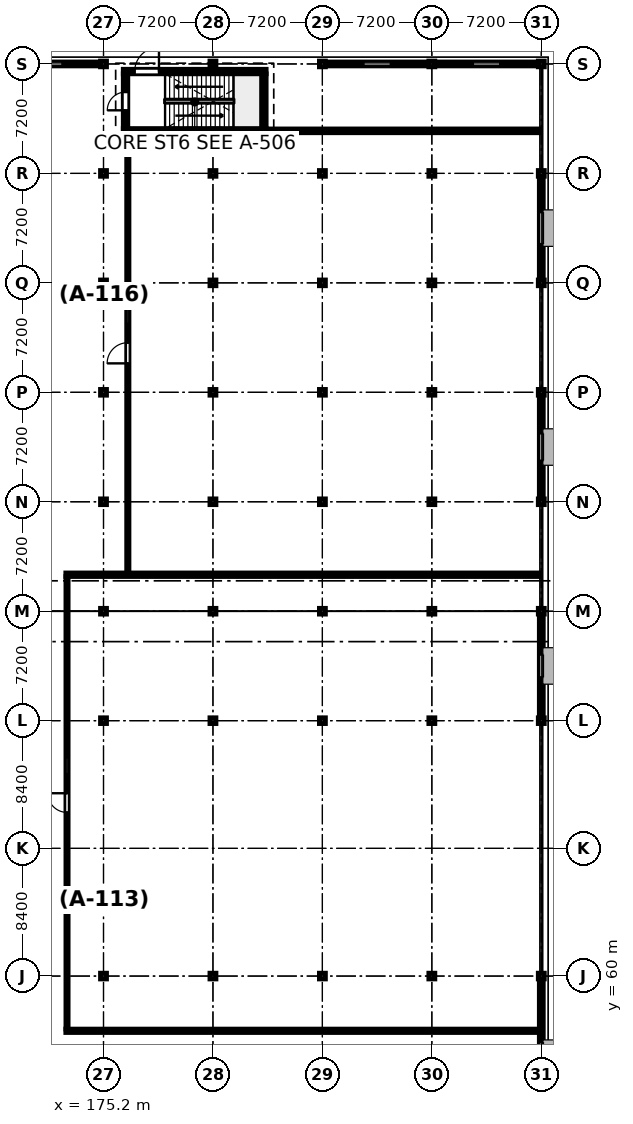
"""IFC4 building model, lengths in metres.
Left out: names, types, materials, properties, quantities, classifications, styles, units other than length and angle.
Written with IfcOpenShell. Run it as: python <this file> out.ifc"""

import sys

from ifc_helpers import new_model, si_unit, direction, frame, frame_2d, origin, origin_2d, place, context, subcontext, project, spatial, rectangle, i_section, extrude, element, fill, save


model = new_model("IFC4")
c1 = context("Model", 3, precision=1e-05, world=origin(), true_north=direction((0.0, 1.0)))
c2 = subcontext(c1, "Body", "Model", "MODEL_VIEW")
j1 = project(units=[si_unit("LENGTHUNIT", "METRE"), si_unit("PLANEANGLEUNIT", "RADIAN")], contexts=[c1])
p1 = place(None, origin())
s1 = spatial("IfcSite", under=j1, at=p1, CompositionType="ELEMENT")
p2 = place(p1, origin())
s2 = spatial("IfcBuilding", under=s1, at=p2, CompositionType="ELEMENT")
p3 = place(p2, origin())
s3 = spatial("IfcBuildingStorey", under=s2, at=p3, CompositionType="ELEMENT", Elevation=0.0)
for number, where, z_axis, x_axis in (
    (1, (175.2, 60.0, 0.0), (0.0, 0.0, 1.0), (1.0, 0.0, 0.0)),
    (2, (175.2, 76.8, 0.0), (0.0, 0.0, 1.0), (1.0, 0.0, 0.0)),
    (3, (175.2, 84.0, 0.0), (0.0, 0.0, 1.0), (1.0, 0.0, 0.0)),
    (4, (175.2, 91.2, 0.0), (0.0, 0.0, 1.0), (1.0, 0.0, 0.0)),
    (5, (175.2, 98.4, 0.0), (0.0, 0.0, 1.0), (1.0, 0.0, 0.0)),
    (6, (175.2, 105.6, 0.0), (0.0, 0.0, 1.0), (1.0, 0.0, 0.0)),
    (7, (175.2, 112.8, 0.0), (0.0, 0.0, 1.0), (1.0, 0.0, 0.0)),
    (8, (175.2, 120.0, 0.0), (0.0, 0.0, 1.0), (1.0, 0.0, 0.0)),
    (9, (182.4, 60.0, 0.0), (0.0, 0.0, 1.0), (1.0, 0.0, 0.0)),
    (10, (182.4, 76.8, 0.0), (0.0, 0.0, 1.0), (1.0, 0.0, 0.0)),
    (11, (182.4, 84.0, 0.0), (0.0, 0.0, 1.0), (1.0, 0.0, 0.0)),
    (12, (182.4, 91.2, 0.0), (0.0, 0.0, 1.0), (1.0, 0.0, 0.0)),
    (13, (182.4, 98.4, 0.0), (0.0, 0.0, 1.0), (1.0, 0.0, 0.0)),
    (14, (182.4, 105.6, 0.0), (0.0, 0.0, 1.0), (1.0, 0.0, 0.0)),
    (15, (182.4, 112.8, 0.0), (0.0, 0.0, 1.0), (1.0, 0.0, 0.0)),
    (16, (182.4, 120.0, 0.0), (0.0, 0.0, 1.0), (1.0, 0.0, 0.0)),
    (17, (189.6, 60.0, 0.0), (0.0, 0.0, 1.0), (1.0, 0.0, 0.0)),
    (18, (189.6, 76.8, 0.0), (0.0, 0.0, 1.0), (1.0, 0.0, 0.0)),
    (19, (189.6, 84.0, 0.0), (0.0, 0.0, 1.0), (1.0, 0.0, 0.0)),
    (20, (189.6, 91.2, 0.0), (0.0, 0.0, 1.0), (1.0, 0.0, 0.0)),
    (21, (189.6, 98.4, 0.0), (0.0, 0.0, 1.0), (1.0, 0.0, 0.0)),
    (22, (189.6, 105.6, 0.0), (0.0, 0.0, 1.0), (1.0, 0.0, 0.0)),
    (23, (189.6, 112.8, 0.0), (0.0, 0.0, 1.0), (1.0, 0.0, 0.0)),
    (24, (189.6, 120.0, 0.0), (0.0, 0.0, 1.0), (1.0, 0.0, 0.0)),
    (25, (196.8, 60.0, 0.0), (0.0, 0.0, 1.0), (1.0, 0.0, 0.0)),
    (26, (196.8, 76.8, 0.0), (0.0, 0.0, 1.0), (1.0, 0.0, 0.0)),
    (27, (196.8, 84.0, 0.0), (0.0, 0.0, 1.0), (1.0, 0.0, 0.0)),
    (28, (196.8, 91.2, 0.0), (0.0, 0.0, 1.0), (1.0, 0.0, 0.0)),
    (29, (196.8, 98.4, 0.0), (0.0, 0.0, 1.0), (1.0, 0.0, 0.0)),
    (30, (196.8, 105.6, 0.0), (0.0, 0.0, 1.0), (1.0, 0.0, 0.0)),
    (31, (196.8, 112.8, 0.0), (0.0, 0.0, 1.0), (1.0, 0.0, 0.0)),
    (32, (196.8, 120.0, 0.0), (0.0, 0.0, 1.0), (1.0, 0.0, 0.0)),
    (33, (204.0, 60.0, 0.0), (0.0, 0.0, 1.0), (1.0, 0.0, 0.0)),
    (34, (204.0, 76.8, 0.0), (0.0, 0.0, 1.0), (1.0, 0.0, 0.0)),
    (35, (204.0, 84.0, 0.0), (0.0, 0.0, 1.0), (1.0, 0.0, 0.0)),
    (36, (204.0, 91.2, 0.0), (0.0, 0.0, 1.0), (1.0, 0.0, 0.0)),
    (37, (204.0, 98.4, 0.0), (0.0, 0.0, 1.0), (1.0, 0.0, 0.0)),
    (38, (204.0, 105.6, 0.0), (0.0, 0.0, 1.0), (1.0, 0.0, 0.0)),
    (39, (204.0, 112.8, 0.0), (0.0, 0.0, 1.0), (1.0, 0.0, 0.0)),
    (40, (204.0, 120.0, 0.0), (0.0, 0.0, 1.0), (1.0, 0.0, 0.0)),
):
    element("IfcColumn", number, at=place(p3, frame(where, z_axis=z_axis, x_axis=x_axis)), inside=s3, PredefinedType="COLUMN", context=c2, shape_type="SweptSolid", body=[
        extrude(i_section(OverallWidth=0.396, OverallDepth=0.381, WebThickness=0.019, FlangeThickness=0.03, FilletRadius=0.015, at=origin_2d()), origin(), (0.0, 0.0, 1.0), 5.4),
    ])
p4 = place(p3, frame((204.0, 59.808, 0.0), z_axis=(0.0, 0.0, 1.0), x_axis=(0.0, -1.0, 0.0)))
e41 = element("IfcWall", 41, at=p4, inside=s3, PredefinedType="STANDARD", context=c2, shape_type="SweptSolid", body=[
    extrude(rectangle(XDim=10.416, YDim=0.26, at=frame_2d((5.208, 0.0))), origin(), (0.0, 0.0, 1.0), 4.442),
])
p5 = place(p4, frame((4.158, 0.0, 0.9)))
e42 = element("IfcOpeningElement", 42, at=p5, cuts=e41, PredefinedType="OPENING", context=c2, shape_type="SweptSolid", body=[
    extrude(rectangle(XDim=2.1, YDim=1.5, at=frame_2d((1.05, 0.75))), frame((0.0, 0.14, 0.0), z_axis=(0.0, -1.0, 0.0), x_axis=(1.0, 0.0, 0.0)), (0.0, 0.0, 1.0), 0.28),
])
p6 = place(p3, frame((204.0, 83.808, 0.0), z_axis=(0.0, 0.0, 1.0), x_axis=(0.0, -1.0, 0.0)))
e43 = element("IfcWall", 43, at=p6, inside=s3, PredefinedType="STANDARD", context=c2, shape_type="SweptSolid", body=[
    extrude(rectangle(XDim=6.816, YDim=0.26, at=frame_2d((3.408, 0.0))), origin(), (0.0, 0.0, 1.0), 4.442),
])
p7 = place(p6, frame((2.658, 0.0, 0.9)))
e44 = element("IfcOpeningElement", 44, at=p7, cuts=e43, PredefinedType="OPENING", context=c2, shape_type="SweptSolid", body=[
    extrude(rectangle(XDim=1.5, YDim=1.5, at=frame_2d((0.75, 0.75))), frame((0.0, 0.14, 0.0), z_axis=(0.0, -1.0, 0.0), x_axis=(1.0, 0.0, 0.0)), (0.0, 0.0, 1.0), 0.28),
])
p8 = place(p3, frame((204.0, 98.208, 0.0), z_axis=(0.0, 0.0, 1.0), x_axis=(0.0, -1.0, 0.0)))
e45 = element("IfcWall", 45, at=p8, inside=s3, PredefinedType="STANDARD", context=c2, shape_type="SweptSolid", body=[
    extrude(rectangle(XDim=6.816, YDim=0.26, at=frame_2d((3.408, 0.0))), origin(), (0.0, 0.0, 1.0), 4.442),
])
p9 = place(p8, frame((2.508, 0.0, 0.9)))
e46 = element("IfcOpeningElement", 46, at=p9, cuts=e45, PredefinedType="OPENING", context=c2, shape_type="SweptSolid", body=[
    extrude(rectangle(XDim=1.8, YDim=1.5, at=frame_2d((0.9, 0.75))), frame((0.0, 0.14, 0.0), z_axis=(0.0, -1.0, 0.0), x_axis=(1.0, 0.0, 0.0)), (0.0, 0.0, 1.0), 0.28),
])
p10 = place(p3, frame((204.0, 112.608, 0.0), z_axis=(0.0, 0.0, 1.0), x_axis=(0.0, -1.0, 0.0)))
e47 = element("IfcWall", 47, at=p10, inside=s3, PredefinedType="STANDARD", context=c2, shape_type="SweptSolid", body=[
    extrude(rectangle(XDim=6.816, YDim=0.26, at=frame_2d((3.408, 0.0))), origin(), (0.0, 0.0, 1.0), 4.442),
])
p11 = place(p10, frame((2.358, 0.0, 0.9)))
e48 = element("IfcOpeningElement", 48, at=p11, cuts=e47, PredefinedType="OPENING", context=c2, shape_type="SweptSolid", body=[
    extrude(rectangle(XDim=2.1, YDim=1.5, at=frame_2d((1.05, 0.75))), frame((0.0, 0.14, 0.0), z_axis=(0.0, -1.0, 0.0), x_axis=(1.0, 0.0, 0.0)), (0.0, 0.0, 1.0), 0.28),
])
p12 = place(p3, frame((168.205, 120.0, 0.0), z_axis=(0.0, 0.0, 1.0), x_axis=(1.0, 0.0, 0.0)))
e49 = element("IfcWall", 49, at=p12, inside=s3, PredefinedType="STANDARD", context=c2, shape_type="SweptSolid", body=[
    extrude(rectangle(XDim=6.79, YDim=0.26, at=frame_2d((3.395, 0.0))), origin(), (0.0, 0.0, 1.0), 4.442),
])
p13 = place(p12, frame((2.495, 0.0, 0.9)))
e50 = element("IfcOpeningElement", 50, at=p13, cuts=e49, PredefinedType="OPENING", context=c2, shape_type="SweptSolid", body=[
    extrude(rectangle(XDim=1.8, YDim=1.5, at=frame_2d((0.9, 0.75))), frame((0.0, 0.14, 0.0), z_axis=(0.0, -1.0, 0.0), x_axis=(1.0, 0.0, 0.0)), (0.0, 0.0, 1.0), 0.28),
])
p14 = place(p3, frame((189.805, 120.0, 0.0), z_axis=(0.0, 0.0, 1.0), x_axis=(1.0, 0.0, 0.0)))
e51 = element("IfcWall", 51, at=p14, inside=s3, PredefinedType="STANDARD", context=c2, shape_type="SweptSolid", body=[
    extrude(rectangle(XDim=6.79, YDim=0.26, at=frame_2d((3.395, 0.0))), origin(), (0.0, 0.0, 1.0), 4.442),
])
p15 = place(p14, frame((2.495, 0.0, 0.9)))
e52 = element("IfcOpeningElement", 52, at=p15, cuts=e51, PredefinedType="OPENING", context=c2, shape_type="SweptSolid", body=[
    extrude(rectangle(XDim=1.8, YDim=1.5, at=frame_2d((0.9, 0.75))), frame((0.0, 0.14, 0.0), z_axis=(0.0, -1.0, 0.0), x_axis=(1.0, 0.0, 0.0)), (0.0, 0.0, 1.0), 0.28),
])
p16 = place(p3, frame((197.005, 120.0, 0.0), z_axis=(0.0, 0.0, 1.0), x_axis=(1.0, 0.0, 0.0)))
e53 = element("IfcWall", 53, at=p16, inside=s3, PredefinedType="STANDARD", context=c2, shape_type="SweptSolid", body=[
    extrude(rectangle(XDim=6.79, YDim=0.26, at=frame_2d((3.395, 0.0))), origin(), (0.0, 0.0, 1.0), 4.442),
])
p17 = place(p16, frame((2.495, 0.0, 0.9)))
e54 = element("IfcOpeningElement", 54, at=p17, cuts=e53, PredefinedType="OPENING", context=c2, shape_type="SweptSolid", body=[
    extrude(rectangle(XDim=1.8, YDim=1.5, at=frame_2d((0.9, 0.75))), frame((0.0, 0.14, 0.0), z_axis=(0.0, -1.0, 0.0), x_axis=(1.0, 0.0, 0.0)), (0.0, 0.0, 1.0), 0.28),
])
p18 = place(p3, frame((185.9, 115.6, 0.0), z_axis=(0.0, 0.0, 1.0), x_axis=(-1.0, 0.0, 0.0)))
e55 = element("IfcWall", 55, at=p18, inside=s3, PredefinedType="SOLIDWALL", context=c2, shape_type="SweptSolid", body=[
    extrude(rectangle(XDim=9.4, YDim=0.3, at=frame_2d((4.7, 0.0))), origin(), (0.0, 0.0, 1.0), 5.14),
])
p19 = place(p3, frame((176.5, 119.5, 0.0), z_axis=(0.0, 0.0, 1.0), x_axis=(1.0, 0.0, 0.0)))
e56 = element("IfcWall", 56, at=p19, inside=s3, PredefinedType="SOLIDWALL", context=c2, shape_type="SweptSolid", body=[
    extrude(rectangle(XDim=9.4, YDim=0.3, at=frame_2d((4.7, 0.0))), origin(), (0.0, 0.0, 1.0), 5.14),
])
p20 = place(p19, frame((0.75, 0.0, 0.0)))
e57 = element("IfcOpeningElement", 57, at=p20, cuts=e56, PredefinedType="OPENING", context=c2, shape_type="SweptSolid", body=[
    extrude(rectangle(XDim=1.6, YDim=2.15, at=frame_2d((0.8, 1.075))), frame((0.0, 0.16, 0.0), z_axis=(0.0, -1.0, 0.0), x_axis=(1.0, 0.0, 0.0)), (0.0, 0.0, 1.0), 0.32),
])
p21 = place(p3, frame((176.65, 115.75, 0.0), z_axis=(0.0, 0.0, 1.0), x_axis=(0.0, 1.0, 0.0)))
e58 = element("IfcWall", 58, at=p21, inside=s3, PredefinedType="SOLIDWALL", context=c2, shape_type="SweptSolid", body=[
    extrude(rectangle(XDim=3.6, YDim=0.3, at=frame_2d((1.8, 0.0))), origin(), (0.0, 0.0, 1.0), 5.14),
])
p22 = place(p21, frame((1.2, 0.0, 0.0)))
e59 = element("IfcOpeningElement", 59, at=p22, cuts=e58, PredefinedType="OPENING", context=c2, shape_type="SweptSolid", body=[
    extrude(rectangle(XDim=1.2, YDim=2.2, at=frame_2d((0.6, 1.1))), frame((0.0, 0.16, 0.0), z_axis=(0.0, -1.0, 0.0), x_axis=(1.0, 0.0, 0.0)), (0.0, 0.0, 1.0), 0.32),
])
p23 = place(p3, frame((185.75, 119.35, 0.0), z_axis=(0.0, 0.0, 1.0), x_axis=(0.0, -1.0, 0.0)))
e60 = element("IfcWall", 60, at=p23, inside=s3, PredefinedType="SOLIDWALL", context=c2, shape_type="SweptSolid", body=[
    extrude(rectangle(XDim=3.6, YDim=0.3, at=frame_2d((1.8, 0.0))), origin(), (0.0, 0.0, 1.0), 5.14),
])
p24 = place(p3, frame((203.868, 56.4, 0.0), z_axis=(0.0, 0.0, 1.0), x_axis=(-1.0, 0.0, 0.0)))
e61 = element("IfcWall", 61, at=p24, inside=s3, PredefinedType="PARTITIONING", context=c2, shape_type="SweptSolid", body=[
    extrude(rectangle(XDim=31.148, YDim=0.225, at=frame_2d((15.574, 0.0))), origin(), (0.0, 0.0, 1.0), 4.437),
])
p25 = place(p3, frame((172.72, 86.4, 0.0), z_axis=(0.0, 0.0, 1.0), x_axis=(1.0, 0.0, 0.0)))
e62 = element("IfcWall", 62, at=p25, inside=s3, PredefinedType="PARTITIONING", context=c2, shape_type="SweptSolid", body=[
    extrude(rectangle(XDim=31.148, YDim=0.235, at=frame_2d((15.574, 0.0))), origin(), (0.0, 0.0, 1.0), 4.437),
])
p26 = place(p3, frame((185.902, 115.6, 0.0), z_axis=(0.0, 0.0, 1.0), x_axis=(1.0, 0.0, 0.0)))
e63 = element("IfcWall", 63, at=p26, inside=s3, PredefinedType="PARTITIONING", context=c2, shape_type="SweptSolid", body=[
    extrude(rectangle(XDim=17.966, YDim=0.25, at=frame_2d((8.983, 0.0))), origin(), (0.0, 0.0, 1.0), 4.437),
])
p27 = place(p3, frame((172.8, 56.514, 0.0), z_axis=(0.0, 0.0, 1.0), x_axis=(0.0, 1.0, 0.0)))
e64 = element("IfcWall", 64, at=p27, inside=s3, PredefinedType="PARTITIONING", context=c2, shape_type="SweptSolid", body=[
    extrude(rectangle(XDim=29.766, YDim=0.145, at=frame_2d((14.883, 0.0))), origin(), (0.0, 0.0, 1.0), 4.437),
])
p28 = place(p27, frame((14.253, 0.0, 0.0)))
e65 = element("IfcOpeningElement", 65, at=p28, cuts=e64, PredefinedType="OPENING", context=c2, shape_type="SweptSolid", body=[
    extrude(rectangle(XDim=1.26, YDim=2.22, at=frame_2d((0.63, 1.11))), frame((0.0, 0.083, 0.0), z_axis=(0.0, -1.0, 0.0), x_axis=(1.0, 0.0, 0.0)), (0.0, 0.0, 1.0), 0.165),
])
p29 = place(p27, frame((16.763, 0.0, 0.95)))
e66 = element("IfcOpeningElement", 66, at=p29, cuts=e64, PredefinedType="OPENING", context=c2, shape_type="SweptSolid", body=[
    extrude(rectangle(XDim=1.1, YDim=1.3, at=frame_2d((0.55, 0.65))), frame((0.0, 0.083, 0.0), z_axis=(0.0, -1.0, 0.0), x_axis=(1.0, 0.0, 0.0)), (0.0, 0.0, 1.0), 0.165),
])
p30 = place(p3, frame((176.8, 86.52, 0.0), z_axis=(0.0, 0.0, 1.0), x_axis=(0.0, 1.0, 0.0)))
e67 = element("IfcWall", 67, at=p30, inside=s3, PredefinedType="PARTITIONING", context=c2, shape_type="SweptSolid", body=[
    extrude(rectangle(XDim=28.928, YDim=0.15, at=frame_2d((14.464, 0.0))), origin(), (0.0, 0.0, 1.0), 4.437),
])
p31 = place(p30, frame((13.784, 0.0, 0.0)))
e68 = element("IfcOpeningElement", 68, at=p31, cuts=e67, PredefinedType="OPENING", context=c2, shape_type="SweptSolid", body=[
    extrude(rectangle(XDim=1.36, YDim=2.22, at=frame_2d((0.68, 1.11))), frame((0.0, 0.085, 0.0), z_axis=(0.0, -1.0, 0.0), x_axis=(1.0, 0.0, 0.0)), (0.0, 0.0, 1.0), 0.17),
])
p32 = place(p30, frame((16.394, 0.0, 0.95)))
e69 = element("IfcOpeningElement", 69, at=p32, cuts=e67, PredefinedType="OPENING", context=c2, shape_type="SweptSolid", body=[
    extrude(rectangle(XDim=1.35, YDim=1.3, at=frame_2d((0.675, 0.65))), frame((0.0, 0.085, 0.0), z_axis=(0.0, -1.0, 0.0), x_axis=(1.0, 0.0, 0.0)), (0.0, 0.0, 1.0), 0.17),
])
p33 = place(p5, origin())
e70 = element("IfcWindow", 70, at=p33, inside=s3, PartitioningType="SINGLE_PANEL", PredefinedType="WINDOW", context=c2, shape_type="SweptSolid", body=[
    extrude(rectangle(XDim=2.1, YDim=1.5, at=frame_2d((1.05, 0.75))), frame((0.0, 0.03, 0.0), z_axis=(0.0, -1.0, 0.0), x_axis=(1.0, 0.0, 0.0)), (0.0, 0.0, 1.0), 0.06),
])
fill(e42, e70)
p34 = place(p7, origin())
e71 = element("IfcWindow", 71, at=p34, inside=s3, PartitioningType="SINGLE_PANEL", PredefinedType="WINDOW", context=c2, shape_type="SweptSolid", body=[
    extrude(rectangle(XDim=1.5, YDim=1.5, at=frame_2d((0.75, 0.75))), frame((0.0, 0.03, 0.0), z_axis=(0.0, -1.0, 0.0), x_axis=(1.0, 0.0, 0.0)), (0.0, 0.0, 1.0), 0.06),
])
fill(e44, e71)
p35 = place(p9, origin())
e72 = element("IfcWindow", 72, at=p35, inside=s3, PartitioningType="SINGLE_PANEL", PredefinedType="WINDOW", context=c2, shape_type="SweptSolid", body=[
    extrude(rectangle(XDim=1.8, YDim=1.5, at=frame_2d((0.9, 0.75))), frame((0.0, 0.03, 0.0), z_axis=(0.0, -1.0, 0.0), x_axis=(1.0, 0.0, 0.0)), (0.0, 0.0, 1.0), 0.06),
])
fill(e46, e72)
p36 = place(p11, origin())
e73 = element("IfcWindow", 73, at=p36, inside=s3, PartitioningType="SINGLE_PANEL", PredefinedType="WINDOW", context=c2, shape_type="SweptSolid", body=[
    extrude(rectangle(XDim=2.1, YDim=1.5, at=frame_2d((1.05, 0.75))), frame((0.0, 0.03, 0.0), z_axis=(0.0, -1.0, 0.0), x_axis=(1.0, 0.0, 0.0)), (0.0, 0.0, 1.0), 0.06),
])
fill(e48, e73)
p37 = place(p13, origin())
e74 = element("IfcWindow", 74, at=p37, inside=s3, PartitioningType="SINGLE_PANEL", PredefinedType="WINDOW", context=c2, shape_type="SweptSolid", body=[
    extrude(rectangle(XDim=1.8, YDim=1.5, at=frame_2d((0.9, 0.75))), frame((0.0, 0.03, 0.0), z_axis=(0.0, -1.0, 0.0), x_axis=(1.0, 0.0, 0.0)), (0.0, 0.0, 1.0), 0.06),
])
fill(e50, e74)
p38 = place(p15, origin())
e75 = element("IfcWindow", 75, at=p38, inside=s3, PartitioningType="SINGLE_PANEL", PredefinedType="WINDOW", context=c2, shape_type="SweptSolid", body=[
    extrude(rectangle(XDim=1.8, YDim=1.5, at=frame_2d((0.9, 0.75))), frame((0.0, 0.03, 0.0), z_axis=(0.0, -1.0, 0.0), x_axis=(1.0, 0.0, 0.0)), (0.0, 0.0, 1.0), 0.06),
])
fill(e52, e75)
p39 = place(p17, origin())
e76 = element("IfcWindow", 76, at=p39, inside=s3, PartitioningType="SINGLE_PANEL", PredefinedType="WINDOW", context=c2, shape_type="SweptSolid", body=[
    extrude(rectangle(XDim=1.8, YDim=1.5, at=frame_2d((0.9, 0.75))), frame((0.0, 0.03, 0.0), z_axis=(0.0, -1.0, 0.0), x_axis=(1.0, 0.0, 0.0)), (0.0, 0.0, 1.0), 0.06),
])
fill(e54, e76)
p40 = place(p20, origin())
e77 = element("IfcDoor", 77, at=p40, inside=s3, OperationType="SINGLE_SWING_RIGHT", PredefinedType="DOOR", context=c2, shape_type="SweptSolid", body=[
    extrude(rectangle(XDim=1.6, YDim=2.15, at=frame_2d((0.8, 1.075))), frame((0.0, 0.025, 0.0), z_axis=(0.0, -1.0, 0.0), x_axis=(1.0, 0.0, 0.0)), (0.0, 0.0, 1.0), 0.05),
])
fill(e57, e77)
p41 = place(p22, origin())
e78 = element("IfcDoor", 78, at=p41, inside=s3, OperationType="SINGLE_SWING_LEFT", PredefinedType="DOOR", context=c2, shape_type="SweptSolid", body=[
    extrude(rectangle(XDim=1.2, YDim=2.2, at=frame_2d((0.6, 1.1))), frame((0.0, 0.025, 0.0), z_axis=(0.0, -1.0, 0.0), x_axis=(1.0, 0.0, 0.0)), (0.0, 0.0, 1.0), 0.05),
])
fill(e59, e78)
p42 = place(p28, origin())
e79 = element("IfcDoor", 79, at=p42, inside=s3, OperationType="SINGLE_SWING_RIGHT", PredefinedType="DOOR", context=c2, shape_type="SweptSolid", body=[
    extrude(rectangle(XDim=1.26, YDim=2.22, at=frame_2d((0.63, 1.11))), frame((0.0, 0.025, 0.0), z_axis=(0.0, -1.0, 0.0), x_axis=(1.0, 0.0, 0.0)), (0.0, 0.0, 1.0), 0.05),
])
fill(e65, e79)
p43 = place(p29, origin())
e80 = element("IfcWindow", 80, at=p43, inside=s3, PartitioningType="SINGLE_PANEL", PredefinedType="WINDOW", context=c2, shape_type="SweptSolid", body=[
    extrude(rectangle(XDim=1.1, YDim=1.3, at=frame_2d((0.55, 0.65))), frame((0.0, 0.03, 0.0), z_axis=(0.0, -1.0, 0.0), x_axis=(1.0, 0.0, 0.0)), (0.0, 0.0, 1.0), 0.06),
])
fill(e66, e80)
p44 = place(p31, origin())
e81 = element("IfcDoor", 81, at=p44, inside=s3, OperationType="SINGLE_SWING_LEFT", PredefinedType="DOOR", context=c2, shape_type="SweptSolid", body=[
    extrude(rectangle(XDim=1.36, YDim=2.22, at=frame_2d((0.68, 1.11))), frame((0.0, 0.025, 0.0), z_axis=(0.0, -1.0, 0.0), x_axis=(1.0, 0.0, 0.0)), (0.0, 0.0, 1.0), 0.05),
])
fill(e68, e81)
p45 = place(p32, origin())
e82 = element("IfcWindow", 82, at=p45, inside=s3, PartitioningType="SINGLE_PANEL", PredefinedType="WINDOW", context=c2, shape_type="SweptSolid", body=[
    extrude(rectangle(XDim=1.35, YDim=1.3, at=frame_2d((0.675, 0.65))), frame((0.0, 0.03, 0.0), z_axis=(0.0, -1.0, 0.0), x_axis=(1.0, 0.0, 0.0)), (0.0, 0.0, 1.0), 0.06),
])
fill(e69, e82)
save(model, sys.argv[1])
